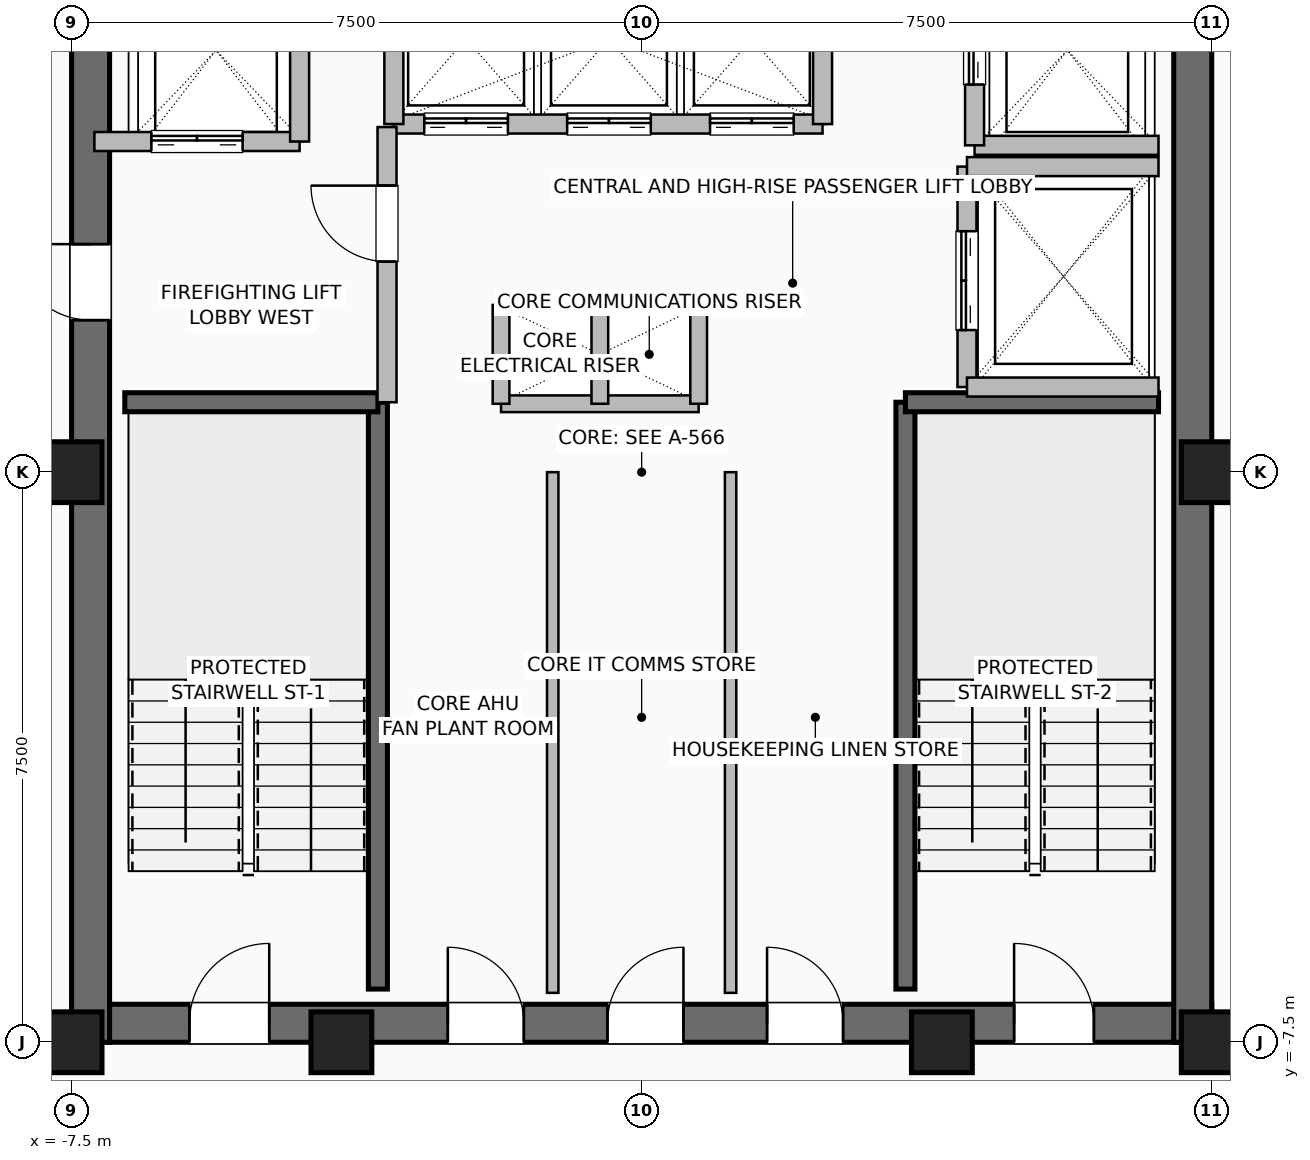
"""IFC4 building model, lengths in metres.
Left out: names, types, materials, properties, quantities, classifications, styles, units other than length and angle.
Written with IfcOpenShell. Run it as: python <this file> out.ifc"""

import sys

from ifc_helpers import new_model, si_unit, direction, frame, frame_2d, origin, origin_2d, place, context, subcontext, project, spatial, rectangle, hollow_rectangle, extrude, element, fill, save


model = new_model("IFC4")
c1 = context("Model", 3, precision=1e-05, world=origin(), true_north=direction((0.0, 1.0)))
c2 = subcontext(c1, "Body", "Model", "MODEL_VIEW")
j1 = project(units=[si_unit("LENGTHUNIT", "METRE"), si_unit("PLANEANGLEUNIT", "RADIAN")], contexts=[c1])
p1 = place(None, origin())
s1 = spatial("IfcSite", under=j1, at=p1, CompositionType="ELEMENT")
p2 = place(p1, origin())
s2 = spatial("IfcBuilding", under=s1, at=p2, CompositionType="ELEMENT")
p3 = place(p2, frame((0.0, 0.0, 264.8)))
s3 = spatial("IfcBuildingStorey", under=s2, at=p3, CompositionType="ELEMENT", Elevation=264.8)
for number, where, z_axis, x_axis in (
    (1, (-7.5, -7.5, 0.0), (0.0, 0.0, 1.0), (1.0, 0.0, 0.0)),
    (2, (-3.95, -7.5, 0.0), (0.0, 0.0, 1.0), (1.0, 0.0, 0.0)),
    (3, (3.95, -7.5, 0.0), (0.0, 0.0, 1.0), (1.0, 0.0, 0.0)),
    (4, (7.5, -7.5, 0.0), (0.0, 0.0, 1.0), (1.0, 0.0, 0.0)),
    (5, (7.5, 0.0, 0.0), (0.0, 0.0, 1.0), (1.0, 0.0, 0.0)),
    (6, (-7.5, 0.0, 0.0), (0.0, 0.0, 1.0), (1.0, 0.0, 0.0)),
):
    element("IfcColumn", number, at=place(p3, frame(where, z_axis=z_axis, x_axis=x_axis)), inside=s3, PredefinedType="COLUMN", context=c2, shape_type="SweptSolid", body=[
        extrude(hollow_rectangle(XDim=0.8, YDim=0.8, WallThickness=0.04, at=origin_2d()), origin(), (0.0, 0.0, 1.0), 3.6),
    ])
p4 = place(p3, frame((-7.5, -7.25, 0.0), z_axis=(0.0, 0.0, 1.0), x_axis=(1.0, 0.0, 0.0)))
e7 = element("IfcWall", 7, at=p4, inside=s3, PredefinedType="SHEAR", context=c2, shape_type="SweptSolid", body=[
    extrude(rectangle(XDim=15.0, YDim=0.5, at=frame_2d((7.5, 0.0))), origin(), (0.0, 0.0, 1.0), 3.36),
])
p5 = place(p4, frame((1.55, 0.0, 0.0)))
e8 = element("IfcOpeningElement", 8, at=p5, cuts=e7, PredefinedType="OPENING", context=c2, shape_type="SweptSolid", body=[
    extrude(rectangle(XDim=1.05, YDim=2.08, at=frame_2d((0.525, 1.04))), frame((0.0, 0.26, 0.0), z_axis=(0.0, -1.0, 0.0), x_axis=(1.0, 0.0, 0.0)), (0.0, 0.0, 1.0), 0.52),
])
p6 = place(p4, frame((12.4, 0.0, 0.0)))
e9 = element("IfcOpeningElement", 9, at=p6, cuts=e7, PredefinedType="OPENING", context=c2, shape_type="SweptSolid", body=[
    extrude(rectangle(XDim=1.05, YDim=2.08, at=frame_2d((0.525, 1.04))), frame((0.0, 0.26, 0.0), z_axis=(0.0, -1.0, 0.0), x_axis=(1.0, 0.0, 0.0)), (0.0, 0.0, 1.0), 0.52),
])
p7 = place(p4, frame((4.95, 0.0, 0.0)))
e10 = element("IfcOpeningElement", 10, at=p7, cuts=e7, PredefinedType="OPENING", context=c2, shape_type="SweptSolid", body=[
    extrude(rectangle(XDim=1.0, YDim=2.08, at=frame_2d((0.5, 1.04))), frame((0.0, 0.26, 0.0), z_axis=(0.0, -1.0, 0.0), x_axis=(1.0, 0.0, 0.0)), (0.0, 0.0, 1.0), 0.52),
])
p8 = place(p4, frame((7.05, 0.0, 0.0)))
e11 = element("IfcOpeningElement", 11, at=p8, cuts=e7, PredefinedType="OPENING", context=c2, shape_type="SweptSolid", body=[
    extrude(rectangle(XDim=1.0, YDim=2.08, at=frame_2d((0.5, 1.04))), frame((0.0, 0.26, 0.0), z_axis=(0.0, -1.0, 0.0), x_axis=(1.0, 0.0, 0.0)), (0.0, 0.0, 1.0), 0.52),
])
p9 = place(p4, frame((9.15, 0.0, 0.0)))
e12 = element("IfcOpeningElement", 12, at=p9, cuts=e7, PredefinedType="OPENING", context=c2, shape_type="SweptSolid", body=[
    extrude(rectangle(XDim=1.0, YDim=2.08, at=frame_2d((0.5, 1.04))), frame((0.0, 0.26, 0.0), z_axis=(0.0, -1.0, 0.0), x_axis=(1.0, 0.0, 0.0)), (0.0, 0.0, 1.0), 0.52),
])
p10 = place(p3, frame((-7.25, -7.5, 0.0), z_axis=(0.0, 0.0, 1.0), x_axis=(0.0, 1.0, 0.0)))
e13 = element("IfcWall", 13, at=p10, inside=s3, PredefinedType="SHEAR", context=c2, shape_type="SweptSolid", body=[
    extrude(rectangle(XDim=15.0, YDim=0.5, at=frame_2d((7.5, 0.0))), origin(), (0.0, 0.0, 1.0), 3.36),
])
p11 = place(p10, frame((9.5, 0.0, 0.0)))
e14 = element("IfcOpeningElement", 14, at=p11, cuts=e13, PredefinedType="OPENING", context=c2, shape_type="SweptSolid", body=[
    extrude(rectangle(XDim=1.0, YDim=2.08, at=frame_2d((0.5, 1.04))), frame((0.0, 0.26, 0.0), z_axis=(0.0, -1.0, 0.0), x_axis=(1.0, 0.0, 0.0)), (0.0, 0.0, 1.0), 0.52),
])
p12 = place(p3, frame((7.25, -7.5, 0.0), z_axis=(0.0, 0.0, 1.0), x_axis=(0.0, 1.0, 0.0)))
e15 = element("IfcWall", 15, at=p12, inside=s3, PredefinedType="SHEAR", context=c2, shape_type="SweptSolid", body=[
    extrude(rectangle(XDim=15.0, YDim=0.5, at=frame_2d((7.5, 0.0))), origin(), (0.0, 0.0, 1.0), 3.36),
])
p13 = place(p3, frame((-3.47, -6.8, 0.0), z_axis=(0.0, 0.0, 1.0), x_axis=(0.0, 1.0, 0.0)))
e16 = element("IfcWall", 16, at=p13, inside=s3, PredefinedType="SHEAR", context=c2, shape_type="SweptSolid", body=[
    extrude(rectangle(XDim=7.72, YDim=0.25, at=frame_2d((3.86, 0.0))), origin(), (0.0, 0.0, 1.0), 3.36),
])
p14 = place(p3, frame((-6.8, 0.92, 0.0), z_axis=(0.0, 0.0, 1.0), x_axis=(1.0, 0.0, 0.0)))
e17 = element("IfcWall", 17, at=p14, inside=s3, PredefinedType="SHEAR", context=c2, shape_type="SweptSolid", body=[
    extrude(rectangle(XDim=3.33, YDim=0.25, at=frame_2d((1.665, 0.0))), origin(), (0.0, 0.0, 1.0), 3.36),
])
p15 = place(p3, frame((3.47, -6.8, 0.0), z_axis=(0.0, 0.0, 1.0), x_axis=(0.0, 1.0, 0.0)))
e18 = element("IfcWall", 18, at=p15, inside=s3, PredefinedType="SHEAR", context=c2, shape_type="SweptSolid", body=[
    extrude(rectangle(XDim=7.72, YDim=0.25, at=frame_2d((3.86, 0.0))), origin(), (0.0, 0.0, 1.0), 3.36),
])
p16 = place(p3, frame((3.47, 0.92, 0.0), z_axis=(0.0, 0.0, 1.0), x_axis=(1.0, 0.0, 0.0)))
e19 = element("IfcWall", 19, at=p16, inside=s3, PredefinedType="SHEAR", context=c2, shape_type="SweptSolid", body=[
    extrude(rectangle(XDim=3.33, YDim=0.25, at=frame_2d((1.665, 0.0))), origin(), (0.0, 0.0, 1.0), 3.36),
])
for number, where, z_axis, x_axis in (
    (20, (-1.85, 2.2, 0.0), (0.0, 0.0, 1.0), (1.0, 0.0, 0.0)),
    (21, (-1.85, 0.9, 0.0), (0.0, 0.0, 1.0), (1.0, 0.0, 0.0)),
):
    element("IfcWall", number, at=place(p3, frame(where, z_axis=z_axis, x_axis=x_axis)), inside=s3, PredefinedType="PARTITIONING", context=c2, shape_type="SweptSolid", body=[
        extrude(rectangle(XDim=2.6, YDim=0.22, at=frame_2d((1.3, 0.0))), origin(), (0.0, 0.0, 1.0), 3.36),
    ])
for number, where, z_axis, x_axis in (
    (22, (-0.55, 0.9, 0.0), (0.0, 0.0, 1.0), (0.0, 1.0, 0.0)),
    (23, (0.75, 0.9, 0.0), (0.0, 0.0, 1.0), (0.0, 1.0, 0.0)),
    (24, (-1.85, 0.9, 0.0), (0.0, 0.0, 1.0), (0.0, 1.0, 0.0)),
):
    element("IfcWall", number, at=place(p3, frame(where, z_axis=z_axis, x_axis=x_axis)), inside=s3, PredefinedType="PARTITIONING", context=c2, shape_type="SweptSolid", body=[
        extrude(rectangle(XDim=1.3, YDim=0.22, at=frame_2d((0.65, 0.0))), origin(), (0.0, 0.0, 1.0), 3.36),
    ])
p17 = place(p3, frame((-3.26, 4.58, 0.0), z_axis=(0.0, 0.0, 1.0), x_axis=(1.0, 0.0, 0.0)))
e25 = element("IfcWall", 25, at=p17, inside=s3, PredefinedType="SHEAR", context=c2, shape_type="SweptSolid", body=[
    extrude(rectangle(XDim=5.64, YDim=0.25, at=frame_2d((2.82, 0.0))), origin(), (0.0, 0.0, 1.0), 3.36),
])
p18 = place(p17, frame((0.4, 0.0, 0.0)))
e26 = element("IfcOpeningElement", 26, at=p18, cuts=e25, PredefinedType="OPENING", context=c2, shape_type="SweptSolid", body=[
    extrude(rectangle(XDim=1.1, YDim=2.2, at=frame_2d((0.55, 1.1))), frame((0.0, 0.135, 0.0), z_axis=(0.0, -1.0, 0.0), x_axis=(1.0, 0.0, 0.0)), (0.0, 0.0, 1.0), 0.27),
])
p19 = place(p17, frame((2.28, 0.0, 0.0)))
e27 = element("IfcOpeningElement", 27, at=p19, cuts=e25, PredefinedType="OPENING", context=c2, shape_type="SweptSolid", body=[
    extrude(rectangle(XDim=1.1, YDim=2.2, at=frame_2d((0.55, 1.1))), frame((0.0, 0.135, 0.0), z_axis=(0.0, -1.0, 0.0), x_axis=(1.0, 0.0, 0.0)), (0.0, 0.0, 1.0), 0.27),
])
p20 = place(p17, frame((4.16, 0.0, 0.0)))
e28 = element("IfcOpeningElement", 28, at=p20, cuts=e25, PredefinedType="OPENING", context=c2, shape_type="SweptSolid", body=[
    extrude(rectangle(XDim=1.1, YDim=2.2, at=frame_2d((0.55, 1.1))), frame((0.0, 0.135, 0.0), z_axis=(0.0, -1.0, 0.0), x_axis=(1.0, 0.0, 0.0)), (0.0, 0.0, 1.0), 0.27),
])
for number, where, z_axis, x_axis in (
    (29, (-3.26, 4.58, 0.0), (0.0, 0.0, 1.0), (0.0, 1.0, 0.0)),
    (30, (2.38, 4.58, 0.0), (0.0, 0.0, 1.0), (0.0, 1.0, 0.0)),
):
    element("IfcWall", number, at=place(p3, frame(where, z_axis=z_axis, x_axis=x_axis)), inside=s3, PredefinedType="SHEAR", context=c2, shape_type="SweptSolid", body=[
        extrude(rectangle(XDim=2.22, YDim=0.25, at=frame_2d((1.11, 0.0))), origin(), (0.0, 0.0, 1.0), 3.36),
    ])
p21 = place(p3, frame((-7.2, 4.35, 0.0), z_axis=(0.0, 0.0, 1.0), x_axis=(1.0, 0.0, 0.0)))
e31 = element("IfcWall", 31, at=p21, inside=s3, PredefinedType="SHEAR", context=c2, shape_type="SweptSolid", body=[
    extrude(rectangle(XDim=2.7, YDim=0.25, at=frame_2d((1.35, 0.0))), origin(), (0.0, 0.0, 1.0), 3.36),
])
p22 = place(p21, frame((0.75, 0.0, 0.0)))
e32 = element("IfcOpeningElement", 32, at=p22, cuts=e31, PredefinedType="OPENING", context=c2, shape_type="SweptSolid", body=[
    extrude(rectangle(XDim=1.2, YDim=2.2, at=frame_2d((0.6, 1.1))), frame((0.0, 0.135, 0.0), z_axis=(0.0, -1.0, 0.0), x_axis=(1.0, 0.0, 0.0)), (0.0, 0.0, 1.0), 0.27),
])
p23 = place(p3, frame((-4.5, 4.35, 0.0), z_axis=(0.0, 0.0, 1.0), x_axis=(0.0, 1.0, 0.0)))
e33 = element("IfcWall", 33, at=p23, inside=s3, PredefinedType="SHEAR", context=c2, shape_type="SweptSolid", body=[
    extrude(rectangle(XDim=2.85, YDim=0.25, at=frame_2d((1.425, 0.0))), origin(), (0.0, 0.0, 1.0), 3.36),
])
p24 = place(p3, frame((4.38, 4.3, 0.0), z_axis=(0.0, 0.0, 1.0), x_axis=(1.0, 0.0, 0.0)))
e34 = element("IfcWall", 34, at=p24, inside=s3, PredefinedType="SHEAR", context=c2, shape_type="SweptSolid", body=[
    extrude(rectangle(XDim=2.42, YDim=0.25, at=frame_2d((1.21, 0.0))), origin(), (0.0, 0.0, 1.0), 3.36),
])
p25 = place(p3, frame((4.38, 4.3, 0.0), z_axis=(0.0, 0.0, 1.0), x_axis=(0.0, 1.0, 0.0)))
e35 = element("IfcWall", 35, at=p25, inside=s3, PredefinedType="SHEAR", context=c2, shape_type="SweptSolid", body=[
    extrude(rectangle(XDim=2.5, YDim=0.25, at=frame_2d((1.25, 0.0))), origin(), (0.0, 0.0, 1.0), 3.36),
])
p26 = place(p25, frame((0.8, 0.0, 0.0)))
e36 = element("IfcOpeningElement", 36, at=p26, cuts=e35, PredefinedType="OPENING", context=c2, shape_type="SweptSolid", body=[
    extrude(rectangle(XDim=1.2, YDim=2.2, at=frame_2d((0.6, 1.1))), frame((0.0, 0.135, 0.0), z_axis=(0.0, -1.0, 0.0), x_axis=(1.0, 0.0, 0.0)), (0.0, 0.0, 1.0), 0.27),
])
p27 = place(p3, frame((4.28, 1.12, 0.0), z_axis=(0.0, 0.0, 1.0), x_axis=(0.0, 1.0, 0.0)))
e37 = element("IfcWall", 37, at=p27, inside=s3, PredefinedType="SHEAR", context=c2, shape_type="SweptSolid", body=[
    extrude(rectangle(XDim=2.9, YDim=0.25, at=frame_2d((1.45, 0.0))), origin(), (0.0, 0.0, 1.0), 3.36),
])
p28 = place(p27, frame((0.75, 0.0, 0.0)))
e38 = element("IfcOpeningElement", 38, at=p28, cuts=e37, PredefinedType="OPENING", context=c2, shape_type="SweptSolid", body=[
    extrude(rectangle(XDim=1.3, YDim=2.3, at=frame_2d((0.65, 1.15))), frame((0.0, 0.135, 0.0), z_axis=(0.0, -1.0, 0.0), x_axis=(1.0, 0.0, 0.0)), (0.0, 0.0, 1.0), 0.27),
])
for number, where, z_axis, x_axis in (
    (39, (4.28, 1.12, 0.0), (0.0, 0.0, 1.0), (1.0, 0.0, 0.0)),
    (40, (4.28, 4.02, 0.0), (0.0, 0.0, 1.0), (1.0, 0.0, 0.0)),
):
    element("IfcWall", number, at=place(p3, frame(where, z_axis=z_axis, x_axis=x_axis)), inside=s3, PredefinedType="SHEAR", context=c2, shape_type="SweptSolid", body=[
        extrude(rectangle(XDim=2.52, YDim=0.25, at=frame_2d((1.26, 0.0))), origin(), (0.0, 0.0, 1.0), 3.36),
    ])
p29 = place(p3, frame((-3.35, 0.92, 0.0), z_axis=(0.0, 0.0, 1.0), x_axis=(0.0, 1.0, 0.0)))
e41 = element("IfcWall", 41, at=p29, inside=s3, PredefinedType="SHEAR", context=c2, shape_type="SweptSolid", body=[
    extrude(rectangle(XDim=3.62, YDim=0.25, at=frame_2d((1.81, 0.0))), origin(), (0.0, 0.0, 1.0), 3.36),
])
p30 = place(p29, frame((1.85, 0.0, 0.0)))
e42 = element("IfcOpeningElement", 42, at=p30, cuts=e41, PredefinedType="OPENING", context=c2, shape_type="SweptSolid", body=[
    extrude(rectangle(XDim=1.0, YDim=2.08, at=frame_2d((0.5, 1.04))), frame((0.0, 0.135, 0.0), z_axis=(0.0, -1.0, 0.0), x_axis=(1.0, 0.0, 0.0)), (0.0, 0.0, 1.0), 0.27),
])
for number, where, z_axis, x_axis in (
    (43, (-1.17, -6.85, 0.0), (0.0, 0.0, 1.0), (0.0, 1.0, 0.0)),
    (44, (1.17, -6.85, 0.0), (0.0, 0.0, 1.0), (0.0, 1.0, 0.0)),
):
    element("IfcWall", number, at=place(p3, frame(where, z_axis=z_axis, x_axis=x_axis)), inside=s3, PredefinedType="PARTITIONING", context=c2, shape_type="SweptSolid", body=[
        extrude(rectangle(XDim=6.85, YDim=0.15, at=frame_2d((3.425, 0.0))), origin(), (0.0, 0.0, 1.0), 3.36),
    ])
p31 = place(p3, frame((7.45, -7.48, 0.0), z_axis=(0.0, 0.0, 1.0), x_axis=(1.0, 0.0, 0.0)))
e45 = element("IfcWall", 45, at=p31, inside=s3, PredefinedType="PARTITIONING", context=c2, shape_type="SweptSolid", body=[
    extrude(rectangle(XDim=0.95, YDim=0.15, at=frame_2d((0.475, 0.0))), origin(), (0.0, 0.0, 1.0), 3.36),
])
p32 = place(p5, origin())
e46 = element("IfcDoor", 46, at=p32, inside=s3, OperationType="SINGLE_SWING_RIGHT", PredefinedType="DOOR", context=c2, shape_type="SweptSolid", body=[
    extrude(rectangle(XDim=1.05, YDim=2.08, at=frame_2d((0.525, 1.04))), frame((0.0, 0.025, 0.0), z_axis=(0.0, -1.0, 0.0), x_axis=(1.0, 0.0, 0.0)), (0.0, 0.0, 1.0), 0.05),
])
fill(e8, e46)
p33 = place(p6, origin())
e47 = element("IfcDoor", 47, at=p33, inside=s3, OperationType="SINGLE_SWING_LEFT", PredefinedType="DOOR", context=c2, shape_type="SweptSolid", body=[
    extrude(rectangle(XDim=1.05, YDim=2.08, at=frame_2d((0.525, 1.04))), frame((0.0, 0.025, 0.0), z_axis=(0.0, -1.0, 0.0), x_axis=(1.0, 0.0, 0.0)), (0.0, 0.0, 1.0), 0.05),
])
fill(e9, e47)
p34 = place(p11, origin())
e48 = element("IfcDoor", 48, at=p34, inside=s3, OperationType="SINGLE_SWING_RIGHT", PredefinedType="DOOR", context=c2, shape_type="SweptSolid", body=[
    extrude(rectangle(XDim=1.0, YDim=2.08, at=frame_2d((0.5, 1.04))), frame((0.0, 0.025, 0.0), z_axis=(0.0, -1.0, 0.0), x_axis=(1.0, 0.0, 0.0)), (0.0, 0.0, 1.0), 0.05),
])
fill(e14, e48)
p35 = place(p7, origin())
e49 = element("IfcDoor", 49, at=p35, inside=s3, OperationType="SINGLE_SWING_LEFT", PredefinedType="DOOR", context=c2, shape_type="SweptSolid", body=[
    extrude(rectangle(XDim=1.0, YDim=2.08, at=frame_2d((0.5, 1.04))), frame((0.0, 0.025, 0.0), z_axis=(0.0, -1.0, 0.0), x_axis=(1.0, 0.0, 0.0)), (0.0, 0.0, 1.0), 0.05),
])
fill(e10, e49)
p36 = place(p8, origin())
e50 = element("IfcDoor", 50, at=p36, inside=s3, OperationType="SINGLE_SWING_RIGHT", PredefinedType="DOOR", context=c2, shape_type="SweptSolid", body=[
    extrude(rectangle(XDim=1.0, YDim=2.08, at=frame_2d((0.5, 1.04))), frame((0.0, 0.025, 0.0), z_axis=(0.0, -1.0, 0.0), x_axis=(1.0, 0.0, 0.0)), (0.0, 0.0, 1.0), 0.05),
])
fill(e11, e50)
p37 = place(p9, origin())
e51 = element("IfcDoor", 51, at=p37, inside=s3, OperationType="SINGLE_SWING_LEFT", PredefinedType="DOOR", context=c2, shape_type="SweptSolid", body=[
    extrude(rectangle(XDim=1.0, YDim=2.08, at=frame_2d((0.5, 1.04))), frame((0.0, 0.025, 0.0), z_axis=(0.0, -1.0, 0.0), x_axis=(1.0, 0.0, 0.0)), (0.0, 0.0, 1.0), 0.05),
])
fill(e12, e51)
p38 = place(p18, origin())
e52 = element("IfcDoor", 52, at=p38, inside=s3, OperationType="DOUBLE_DOOR_SLIDING", PredefinedType="DOOR", context=c2, shape_type="SweptSolid", body=[
    extrude(rectangle(XDim=1.1, YDim=2.2, at=frame_2d((0.55, 1.1))), frame((0.0, 0.025, 0.0), z_axis=(0.0, -1.0, 0.0), x_axis=(1.0, 0.0, 0.0)), (0.0, 0.0, 1.0), 0.05),
])
fill(e26, e52)
p39 = place(p19, origin())
e53 = element("IfcDoor", 53, at=p39, inside=s3, OperationType="DOUBLE_DOOR_SLIDING", PredefinedType="DOOR", context=c2, shape_type="SweptSolid", body=[
    extrude(rectangle(XDim=1.1, YDim=2.2, at=frame_2d((0.55, 1.1))), frame((0.0, 0.025, 0.0), z_axis=(0.0, -1.0, 0.0), x_axis=(1.0, 0.0, 0.0)), (0.0, 0.0, 1.0), 0.05),
])
fill(e27, e53)
p40 = place(p20, origin())
e54 = element("IfcDoor", 54, at=p40, inside=s3, OperationType="DOUBLE_DOOR_SLIDING", PredefinedType="DOOR", context=c2, shape_type="SweptSolid", body=[
    extrude(rectangle(XDim=1.1, YDim=2.2, at=frame_2d((0.55, 1.1))), frame((0.0, 0.025, 0.0), z_axis=(0.0, -1.0, 0.0), x_axis=(1.0, 0.0, 0.0)), (0.0, 0.0, 1.0), 0.05),
])
fill(e28, e54)
p41 = place(p22, origin())
e55 = element("IfcDoor", 55, at=p41, inside=s3, OperationType="DOUBLE_DOOR_SLIDING", PredefinedType="DOOR", context=c2, shape_type="SweptSolid", body=[
    extrude(rectangle(XDim=1.2, YDim=2.2, at=frame_2d((0.6, 1.1))), frame((0.0, 0.025, 0.0), z_axis=(0.0, -1.0, 0.0), x_axis=(1.0, 0.0, 0.0)), (0.0, 0.0, 1.0), 0.05),
])
fill(e32, e55)
p42 = place(p26, origin())
e56 = element("IfcDoor", 56, at=p42, inside=s3, OperationType="DOUBLE_DOOR_SLIDING", PredefinedType="DOOR", context=c2, shape_type="SweptSolid", body=[
    extrude(rectangle(XDim=1.2, YDim=2.2, at=frame_2d((0.6, 1.1))), frame((0.0, 0.025, 0.0), z_axis=(0.0, -1.0, 0.0), x_axis=(1.0, 0.0, 0.0)), (0.0, 0.0, 1.0), 0.05),
])
fill(e36, e56)
p43 = place(p28, origin())
e57 = element("IfcDoor", 57, at=p43, inside=s3, OperationType="DOUBLE_DOOR_SLIDING", PredefinedType="DOOR", context=c2, shape_type="SweptSolid", body=[
    extrude(rectangle(XDim=1.3, YDim=2.3, at=frame_2d((0.65, 1.15))), frame((0.0, 0.025, 0.0), z_axis=(0.0, -1.0, 0.0), x_axis=(1.0, 0.0, 0.0)), (0.0, 0.0, 1.0), 0.05),
])
fill(e38, e57)
p44 = place(p30, origin())
e58 = element("IfcDoor", 58, at=p44, inside=s3, OperationType="SINGLE_SWING_RIGHT", PredefinedType="DOOR", context=c2, shape_type="SweptSolid", body=[
    extrude(rectangle(XDim=1.0, YDim=2.08, at=frame_2d((0.5, 1.04))), frame((0.0, 0.025, 0.0), z_axis=(0.0, -1.0, 0.0), x_axis=(1.0, 0.0, 0.0)), (0.0, 0.0, 1.0), 0.05),
])
fill(e42, e58)
save(model, sys.argv[1])
